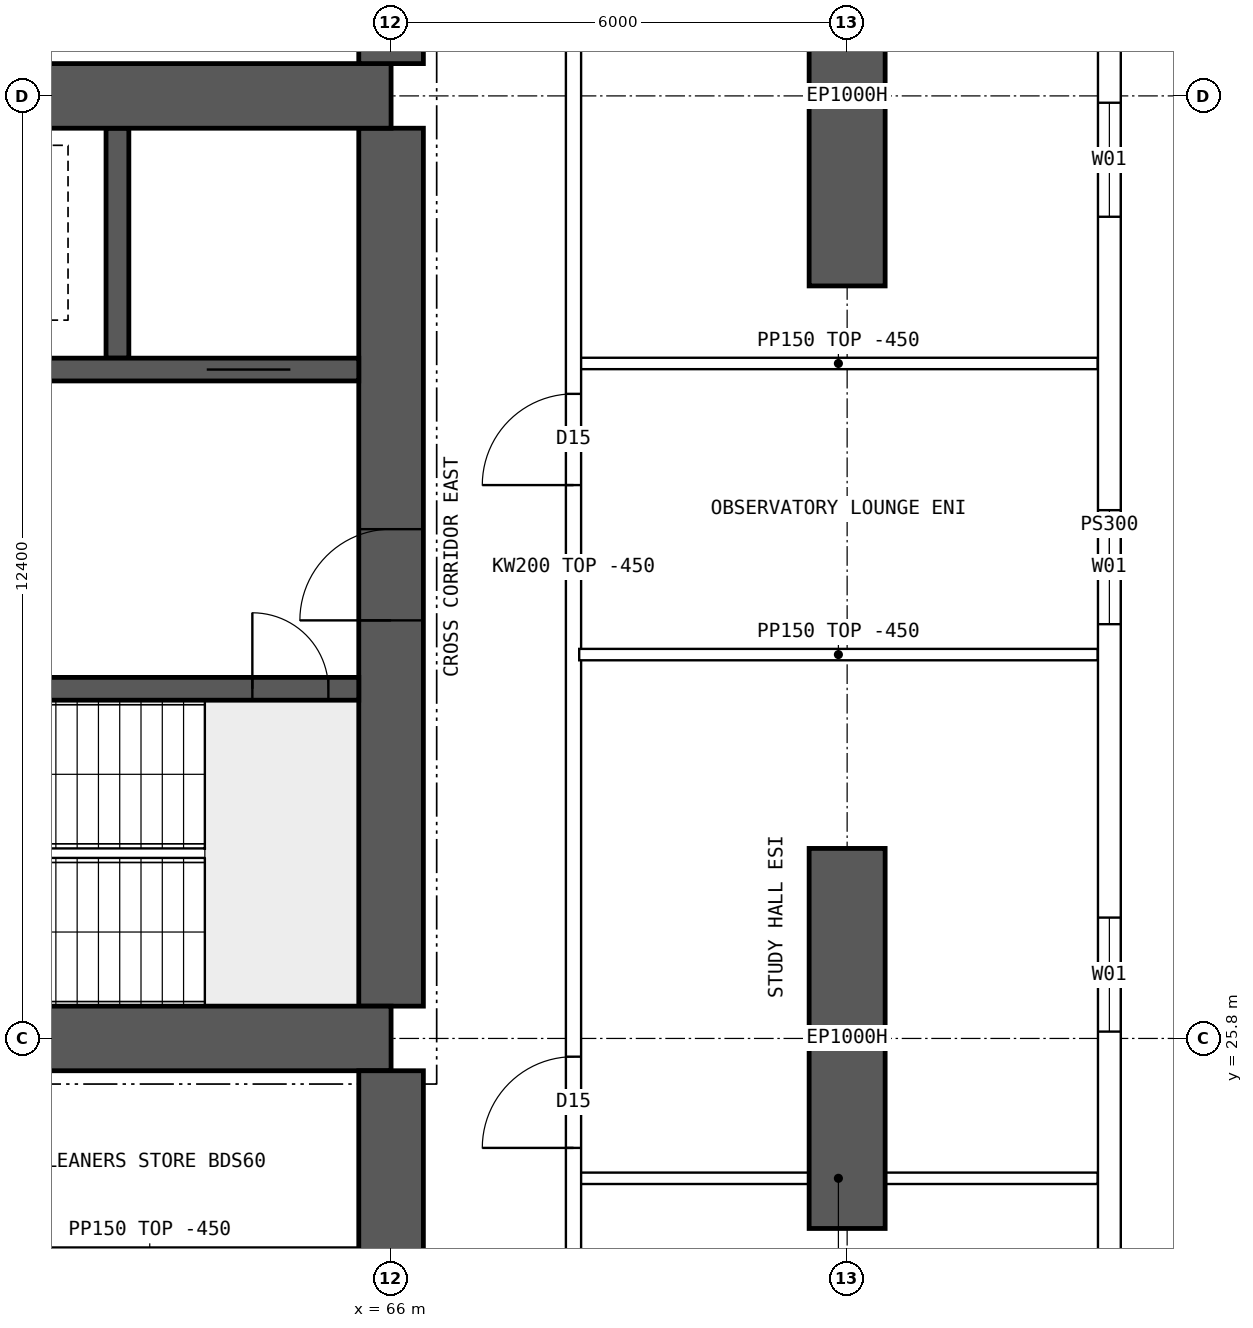
"""IFC4 building model, lengths in metres.
Left out: names, types, materials, properties, quantities, classifications, styles, units other than length and angle.
Written with IfcOpenShell. Run it as: python <this file> out.ifc"""

import sys

from ifc_helpers import new_model, si_unit, direction, frame, frame_2d, origin, place, context, subcontext, project, spatial, polyline, rectangle, outline, extrude, element, fill, save


model = new_model("IFC4")
c1 = context("Model", 3, precision=1e-05, world=origin(), true_north=direction((0.0, 1.0)))
c2 = subcontext(c1, "Body", "Model", "MODEL_VIEW")
j1 = project(units=[si_unit("LENGTHUNIT", "METRE"), si_unit("PLANEANGLEUNIT", "RADIAN")], contexts=[c1])
p1 = place(None, origin())
s1 = spatial("IfcSite", under=j1, at=p1, CompositionType="ELEMENT")
p2 = place(p1, origin())
s2 = spatial("IfcBuilding", under=s1, at=p2, CompositionType="ELEMENT")
p3 = place(p2, frame((0.0, 0.0, 159.85)))
s3 = spatial("IfcBuildingStorey", under=s2, at=p3, CompositionType="ELEMENT", Elevation=159.85)
for number, where, z_axis, x_axis in (
    (1, (72.0, 23.3, 0.0), (0.0, 0.0, 1.0), (0.0, 1.0, 0.0)),
    (2, (72.0, 35.7, 0.0), (0.0, 0.0, 1.0), (0.0, 1.0, 0.0)),
):
    element("IfcWall", number, at=place(p3, frame(where, z_axis=z_axis, x_axis=x_axis)), inside=s3, PredefinedType="SHEAR", context=c2, shape_type="SweptSolid", body=[
        extrude(rectangle(XDim=5.0, YDim=1.0, at=frame_2d((2.5, 0.0))), origin(), (0.0, 0.0, 1.0), 3.75),
    ])
for number, where, z_axis, x_axis in (
    (3, (18.0, 25.8, 0.0), (0.0, 0.0, 1.0), (1.0, 0.0, 0.0)),
    (4, (18.0, 38.2, 0.0), (0.0, 0.0, 1.0), (1.0, 0.0, 0.0)),
):
    element("IfcWall", number, at=place(p3, frame(where, z_axis=z_axis, x_axis=x_axis)), inside=s3, PredefinedType="SHEAR", context=c2, shape_type="SweptSolid", body=[
        extrude(rectangle(XDim=48.0, YDim=0.85, at=frame_2d((24.0, 0.0))), origin(), (0.0, 0.0, 1.0), 3.75),
    ])
p4 = place(p3, frame((66.0, 26.225, 0.0), z_axis=(0.0, 0.0, 1.0), x_axis=(0.0, 1.0, 0.0)))
e5 = element("IfcWall", 5, at=p4, inside=s3, PredefinedType="SHEAR", context=c2, shape_type="SweptSolid", body=[
    extrude(rectangle(XDim=11.55, YDim=0.85, at=frame_2d((5.775, 0.0))), origin(), (0.0, 0.0, 1.0), 3.75),
])
p5 = place(p4, frame((5.075, 0.0, 0.0)))
e6 = element("IfcOpeningElement", 6, at=p5, cuts=e5, PredefinedType="OPENING", context=c2, shape_type="SweptSolid", body=[
    extrude(rectangle(XDim=1.2, YDim=2.1, at=frame_2d((0.6, 1.05))), frame((0.0, 0.435, 0.0), z_axis=(0.0, -1.0, 0.0), x_axis=(1.0, 0.0, 0.0)), (0.0, 0.0, 1.0), 0.87),
])
p6 = place(p3, frame((18.425, 30.4, 0.0), z_axis=(0.0, 0.0, 1.0), x_axis=(1.0, 0.0, 0.0)))
e7 = element("IfcWall", 7, at=p6, inside=s3, PredefinedType="SHEAR", context=c2, shape_type="SweptSolid", body=[
    extrude(rectangle(XDim=47.15, YDim=0.3, at=frame_2d((23.575, 0.0))), origin(), (0.0, 0.0, 1.0), 3.75),
])
p7 = place(p6, frame((0.4, 0.0, 0.0)))
e8 = element("IfcOpeningElement", 8, at=p7, cuts=e7, PredefinedType="OPENING", context=c2, shape_type="SweptSolid", body=[
    extrude(rectangle(XDim=1.0, YDim=2.1, at=frame_2d((0.5, 1.05))), frame((0.0, 0.16, 0.0), z_axis=(0.0, -1.0, 0.0), x_axis=(1.0, 0.0, 0.0)), (0.0, 0.0, 1.0), 0.32),
])
p8 = place(p6, frame((45.75, 0.0, 0.0)))
e9 = element("IfcOpeningElement", 9, at=p8, cuts=e7, PredefinedType="OPENING", context=c2, shape_type="SweptSolid", body=[
    extrude(rectangle(XDim=1.0, YDim=2.1, at=frame_2d((0.5, 1.05))), frame((0.0, 0.16, 0.0), z_axis=(0.0, -1.0, 0.0), x_axis=(1.0, 0.0, 0.0)), (0.0, 0.0, 1.0), 0.32),
])
p9 = place(p6, frame((8.325, 0.0, 0.0)))
e10 = element("IfcOpeningElement", 10, at=p9, cuts=e7, PredefinedType="OPENING", context=c2, shape_type="SweptSolid", body=[
    extrude(rectangle(XDim=1.1, YDim=2.1, at=frame_2d((0.55, 1.05))), frame((0.0, 0.16, 0.0), z_axis=(0.0, -1.0, 0.0), x_axis=(1.0, 0.0, 0.0)), (0.0, 0.0, 1.0), 0.32),
])
p10 = place(p6, frame((10.925, 0.0, 0.0)))
e11 = element("IfcOpeningElement", 11, at=p10, cuts=e7, PredefinedType="OPENING", context=c2, shape_type="SweptSolid", body=[
    extrude(rectangle(XDim=1.1, YDim=2.1, at=frame_2d((0.55, 1.05))), frame((0.0, 0.16, 0.0), z_axis=(0.0, -1.0, 0.0), x_axis=(1.0, 0.0, 0.0)), (0.0, 0.0, 1.0), 0.32),
])
p11 = place(p6, frame((13.525, 0.0, 0.0)))
e12 = element("IfcOpeningElement", 12, at=p11, cuts=e7, PredefinedType="OPENING", context=c2, shape_type="SweptSolid", body=[
    extrude(rectangle(XDim=1.1, YDim=2.1, at=frame_2d((0.55, 1.05))), frame((0.0, 0.16, 0.0), z_axis=(0.0, -1.0, 0.0), x_axis=(1.0, 0.0, 0.0)), (0.0, 0.0, 1.0), 0.32),
])
p12 = place(p6, frame((16.125, 0.0, 0.0)))
e13 = element("IfcOpeningElement", 13, at=p12, cuts=e7, PredefinedType="OPENING", context=c2, shape_type="SweptSolid", body=[
    extrude(rectangle(XDim=1.1, YDim=2.1, at=frame_2d((0.55, 1.05))), frame((0.0, 0.16, 0.0), z_axis=(0.0, -1.0, 0.0), x_axis=(1.0, 0.0, 0.0)), (0.0, 0.0, 1.0), 0.32),
])
p13 = place(p6, frame((18.9, 0.0, 0.0)))
e14 = element("IfcOpeningElement", 14, at=p13, cuts=e7, PredefinedType="OPENING", context=c2, shape_type="SweptSolid", body=[
    extrude(rectangle(XDim=0.9, YDim=2.1, at=frame_2d((0.45, 1.05))), frame((0.0, 0.16, 0.0), z_axis=(0.0, -1.0, 0.0), x_axis=(1.0, 0.0, 0.0)), (0.0, 0.0, 1.0), 0.32),
])
p14 = place(p6, frame((30.192, 0.0, 0.0)))
e15 = element("IfcOpeningElement", 15, at=p14, cuts=e7, PredefinedType="OPENING", context=c2, shape_type="SweptSolid", body=[
    extrude(rectangle(XDim=1.1, YDim=2.1, at=frame_2d((0.55, 1.05))), frame((0.0, 0.16, 0.0), z_axis=(0.0, -1.0, 0.0), x_axis=(1.0, 0.0, 0.0)), (0.0, 0.0, 1.0), 0.32),
])
p15 = place(p6, frame((33.725, 0.0, 0.0)))
e16 = element("IfcOpeningElement", 16, at=p15, cuts=e7, PredefinedType="OPENING", context=c2, shape_type="SweptSolid", body=[
    extrude(rectangle(XDim=1.1, YDim=2.1, at=frame_2d((0.55, 1.05))), frame((0.0, 0.16, 0.0), z_axis=(0.0, -1.0, 0.0), x_axis=(1.0, 0.0, 0.0)), (0.0, 0.0, 1.0), 0.32),
])
p16 = place(p6, frame((37.258, 0.0, 0.0)))
e17 = element("IfcOpeningElement", 17, at=p16, cuts=e7, PredefinedType="OPENING", context=c2, shape_type="SweptSolid", body=[
    extrude(rectangle(XDim=1.1, YDim=2.1, at=frame_2d((0.55, 1.05))), frame((0.0, 0.16, 0.0), z_axis=(0.0, -1.0, 0.0), x_axis=(1.0, 0.0, 0.0)), (0.0, 0.0, 1.0), 0.32),
])
p17 = place(p3, frame((18.425, 34.6, 0.0), z_axis=(0.0, 0.0, 1.0), x_axis=(1.0, 0.0, 0.0)))
e18 = element("IfcWall", 18, at=p17, inside=s3, PredefinedType="SHEAR", context=c2, shape_type="SweptSolid", body=[
    extrude(rectangle(XDim=47.15, YDim=0.3, at=frame_2d((23.575, 0.0))), origin(), (0.0, 0.0, 1.0), 3.75),
])
p18 = place(p17, frame((0.9, 0.0, 0.0)))
e19 = element("IfcOpeningElement", 19, at=p18, cuts=e18, PredefinedType="OPENING", context=c2, shape_type="SweptSolid", body=[
    extrude(rectangle(XDim=1.1, YDim=2.1, at=frame_2d((0.55, 1.05))), frame((0.0, 0.16, 0.0), z_axis=(0.0, -1.0, 0.0), x_axis=(1.0, 0.0, 0.0)), (0.0, 0.0, 1.0), 0.32),
])
p19 = place(p17, frame((45.15, 0.0, 0.0)))
e20 = element("IfcOpeningElement", 20, at=p19, cuts=e18, PredefinedType="OPENING", context=c2, shape_type="SweptSolid", body=[
    extrude(rectangle(XDim=1.1, YDim=2.1, at=frame_2d((0.55, 1.05))), frame((0.0, 0.16, 0.0), z_axis=(0.0, -1.0, 0.0), x_axis=(1.0, 0.0, 0.0)), (0.0, 0.0, 1.0), 0.32),
])
p20 = place(p17, frame((4.175, 0.0, 0.0)))
e21 = element("IfcOpeningElement", 21, at=p20, cuts=e18, PredefinedType="OPENING", context=c2, shape_type="SweptSolid", body=[
    extrude(rectangle(XDim=0.9, YDim=2.1, at=frame_2d((0.45, 1.05))), frame((0.0, 0.16, 0.0), z_axis=(0.0, -1.0, 0.0), x_axis=(1.0, 0.0, 0.0)), (0.0, 0.0, 1.0), 0.32),
])
p21 = place(p17, frame((42.075, 0.0, 0.0)))
e22 = element("IfcOpeningElement", 22, at=p21, cuts=e18, PredefinedType="OPENING", context=c2, shape_type="SweptSolid", body=[
    extrude(rectangle(XDim=0.9, YDim=2.1, at=frame_2d((0.45, 1.05))), frame((0.0, 0.16, 0.0), z_axis=(0.0, -1.0, 0.0), x_axis=(1.0, 0.0, 0.0)), (0.0, 0.0, 1.0), 0.32),
])
p22 = place(p17, frame((8.95, 0.0, 0.0)))
e23 = element("IfcOpeningElement", 23, at=p22, cuts=e18, PredefinedType="OPENING", context=c2, shape_type="SweptSolid", body=[
    extrude(rectangle(XDim=0.9, YDim=2.1, at=frame_2d((0.45, 1.05))), frame((0.0, 0.16, 0.0), z_axis=(0.0, -1.0, 0.0), x_axis=(1.0, 0.0, 0.0)), (0.0, 0.0, 1.0), 0.32),
])
p23 = place(p17, frame((12.924, 0.0, 0.0)))
e24 = element("IfcOpeningElement", 24, at=p23, cuts=e18, PredefinedType="OPENING", context=c2, shape_type="SweptSolid", body=[
    extrude(rectangle(XDim=0.9, YDim=2.1, at=frame_2d((0.45, 1.05))), frame((0.0, 0.16, 0.0), z_axis=(0.0, -1.0, 0.0), x_axis=(1.0, 0.0, 0.0)), (0.0, 0.0, 1.0), 0.32),
])
p24 = place(p17, frame((16.571, 0.0, 0.0)))
e25 = element("IfcOpeningElement", 25, at=p24, cuts=e18, PredefinedType="OPENING", context=c2, shape_type="SweptSolid", body=[
    extrude(rectangle(XDim=0.9, YDim=2.1, at=frame_2d((0.45, 1.05))), frame((0.0, 0.16, 0.0), z_axis=(0.0, -1.0, 0.0), x_axis=(1.0, 0.0, 0.0)), (0.0, 0.0, 1.0), 0.32),
])
p25 = place(p17, frame((20.33, 0.0, 0.0)))
e26 = element("IfcOpeningElement", 26, at=p25, cuts=e18, PredefinedType="OPENING", context=c2, shape_type="SweptSolid", body=[
    extrude(rectangle(XDim=0.9, YDim=2.1, at=frame_2d((0.45, 1.05))), frame((0.0, 0.16, 0.0), z_axis=(0.0, -1.0, 0.0), x_axis=(1.0, 0.0, 0.0)), (0.0, 0.0, 1.0), 0.32),
])
p26 = place(p17, frame((24.736, 0.0, 0.0)))
e27 = element("IfcOpeningElement", 27, at=p26, cuts=e18, PredefinedType="OPENING", context=c2, shape_type="SweptSolid", body=[
    extrude(rectangle(XDim=0.9, YDim=2.1, at=frame_2d((0.45, 1.05))), frame((0.0, 0.16, 0.0), z_axis=(0.0, -1.0, 0.0), x_axis=(1.0, 0.0, 0.0)), (0.0, 0.0, 1.0), 0.32),
])
p27 = place(p17, frame((27.533, 0.0, 0.0)))
e28 = element("IfcOpeningElement", 28, at=p27, cuts=e18, PredefinedType="OPENING", context=c2, shape_type="SweptSolid", body=[
    extrude(rectangle(XDim=0.9, YDim=2.1, at=frame_2d((0.45, 1.05))), frame((0.0, 0.16, 0.0), z_axis=(0.0, -1.0, 0.0), x_axis=(1.0, 0.0, 0.0)), (0.0, 0.0, 1.0), 0.32),
])
p28 = place(p17, frame((29.906, 0.0, 0.0)))
e29 = element("IfcOpeningElement", 29, at=p28, cuts=e18, PredefinedType="OPENING", context=c2, shape_type="SweptSolid", body=[
    extrude(rectangle(XDim=0.9, YDim=2.1, at=frame_2d((0.45, 1.05))), frame((0.0, 0.16, 0.0), z_axis=(0.0, -1.0, 0.0), x_axis=(1.0, 0.0, 0.0)), (0.0, 0.0, 1.0), 0.32),
])
p29 = place(p17, frame((35.376, 0.0, 0.0)))
e30 = element("IfcOpeningElement", 30, at=p29, cuts=e18, PredefinedType="OPENING", context=c2, shape_type="SweptSolid", body=[
    extrude(rectangle(XDim=0.9, YDim=2.1, at=frame_2d((0.45, 1.05))), frame((0.0, 0.16, 0.0), z_axis=(0.0, -1.0, 0.0), x_axis=(1.0, 0.0, 0.0)), (0.0, 0.0, 1.0), 0.32),
])
p30 = place(p3, frame((62.4, 34.75, 0.0), z_axis=(0.0, 0.0, 1.0), x_axis=(0.0, 1.0, 0.0)))
e31 = element("IfcWall", 31, at=p30, inside=s3, PredefinedType="SHEAR", context=c2, shape_type="SweptSolid", body=[
    extrude(rectangle(XDim=3.025, YDim=0.3, at=frame_2d((1.512, 0.0))), origin(), (0.0, 0.0, 1.0), 3.75),
])
for number, where, z_axis, x_axis in (
    (32, (66.0, 17.2, 0.0), (0.0, 0.0, 1.0), (0.0, 1.0, 0.0)),
    (33, (66.0, 38.625, 0.0), (0.0, 0.0, 1.0), (0.0, 1.0, 0.0)),
):
    element("IfcWall", number, at=place(p3, frame(where, z_axis=z_axis, x_axis=x_axis)), inside=s3, PredefinedType="SHEAR", context=c2, shape_type="SweptSolid", body=[
        extrude(rectangle(XDim=8.175, YDim=0.85, at=frame_2d((4.087, 0.0))), origin(), (0.0, 0.0, 1.0), 3.75),
    ])
p31 = place(p3, frame((75.45, 18.6, 0.0), z_axis=(0.0, 0.0, 1.0), x_axis=(0.0, 1.0, 0.0)))
e34 = element("IfcWall", 34, at=p31, inside=s3, PredefinedType="SOLIDWALL", context=c2, shape_type="SweptSolid", body=[
    extrude(outline(polyline([(-0.015, -0.15), (26.815, -0.15), (26.785, 0.15), (0.015, 0.15), (-0.015, -0.15)])), origin(), (0.0, 0.0, 1.0), 3.3),
])
p32 = place(p31, frame((1.93, 0.0, 0.9)))
e35 = element("IfcOpeningElement", 35, at=p32, cuts=e34, PredefinedType="OPENING", context=c2, shape_type="SweptSolid", body=[
    extrude(rectangle(XDim=1.5, YDim=2.0, at=frame_2d((0.75, 1.0))), frame((0.0, 0.16, 0.0), z_axis=(0.0, -1.0, 0.0), x_axis=(1.0, 0.0, 0.0)), (0.0, 0.0, 1.0), 0.32),
])
p33 = place(p31, frame((7.29, 0.0, 0.9)))
e36 = element("IfcOpeningElement", 36, at=p33, cuts=e34, PredefinedType="OPENING", context=c2, shape_type="SweptSolid", body=[
    extrude(rectangle(XDim=1.5, YDim=2.0, at=frame_2d((0.75, 1.0))), frame((0.0, 0.16, 0.0), z_axis=(0.0, -1.0, 0.0), x_axis=(1.0, 0.0, 0.0)), (0.0, 0.0, 1.0), 0.32),
])
p34 = place(p31, frame((12.65, 0.0, 0.9)))
e37 = element("IfcOpeningElement", 37, at=p34, cuts=e34, PredefinedType="OPENING", context=c2, shape_type="SweptSolid", body=[
    extrude(rectangle(XDim=1.5, YDim=2.0, at=frame_2d((0.75, 1.0))), frame((0.0, 0.16, 0.0), z_axis=(0.0, -1.0, 0.0), x_axis=(1.0, 0.0, 0.0)), (0.0, 0.0, 1.0), 0.32),
])
p35 = place(p31, frame((18.01, 0.0, 0.9)))
e38 = element("IfcOpeningElement", 38, at=p35, cuts=e34, PredefinedType="OPENING", context=c2, shape_type="SweptSolid", body=[
    extrude(rectangle(XDim=1.5, YDim=2.0, at=frame_2d((0.75, 1.0))), frame((0.0, 0.16, 0.0), z_axis=(0.0, -1.0, 0.0), x_axis=(1.0, 0.0, 0.0)), (0.0, 0.0, 1.0), 0.32),
])
p36 = place(p31, frame((23.37, 0.0, 0.9)))
e39 = element("IfcOpeningElement", 39, at=p36, cuts=e34, PredefinedType="OPENING", context=c2, shape_type="SweptSolid", body=[
    extrude(rectangle(XDim=1.5, YDim=2.0, at=frame_2d((0.75, 1.0))), frame((0.0, 0.16, 0.0), z_axis=(0.0, -1.0, 0.0), x_axis=(1.0, 0.0, 0.0)), (0.0, 0.0, 1.0), 0.32),
])
p37 = place(p3, frame((60.075, 22.975, 0.0), z_axis=(0.0, 0.0, 1.0), x_axis=(1.0, 0.0, 0.0)))
e40 = element("IfcWall", 40, at=p37, inside=s3, PredefinedType="PARTITIONING", context=c2, shape_type="SweptSolid", body=[
    extrude(rectangle(XDim=5.5, YDim=0.15, at=frame_2d((2.75, 0.0))), origin(), (0.0, 0.0, 1.0), 3.3),
])
p38 = place(p37, frame((0.4, 0.0, 0.0)))
e41 = element("IfcOpeningElement", 41, at=p38, cuts=e40, PredefinedType="OPENING", context=c2, shape_type="SweptSolid", body=[
    extrude(rectangle(XDim=1.0, YDim=2.1, at=frame_2d((0.5, 1.05))), frame((0.0, 0.085, 0.0), z_axis=(0.0, -1.0, 0.0), x_axis=(1.0, 0.0, 0.0)), (0.0, 0.0, 1.0), 0.17),
])
p39 = place(p3, frame((68.475, 30.85, 0.0), z_axis=(0.0, 0.0, 1.0), x_axis=(1.0, 0.0, 0.0)))
e42 = element("IfcWall", 42, at=p39, inside=s3, PredefinedType="PARTITIONING", context=c2, shape_type="SweptSolid", body=[
    extrude(outline(polyline([(0.0, 0.0), (6.82, 0.0), (6.82, 3.3), (3.827, 3.3), (3.825, 2.85), (3.227, 2.85), (3.225, 3.3), (0.0, 3.3), (0.0, 0.0)])), frame((0.0, 0.075, 0.0), z_axis=(0.0, -1.0, 0.0), x_axis=(1.0, 0.0, 0.0)), (0.0, 0.0, 1.0), 0.15),
])
p40 = place(p3, frame((68.4, 10.446, 0.0), z_axis=(0.0, 0.0, 1.0), x_axis=(0.0, 1.0, 0.0)))
e43 = element("IfcWall", 43, at=p40, inside=s3, PredefinedType="SOLIDWALL", context=c2, shape_type="SweptSolid", body=[
    extrude(rectangle(XDim=43.107, YDim=0.2, at=frame_2d((21.554, 0.0))), origin(), (0.0, 0.0, 1.0), 3.3),
])
p41 = place(p40, frame((13.914, 0.0, 0.0)))
e44 = element("IfcOpeningElement", 44, at=p41, cuts=e43, PredefinedType="OPENING", context=c2, shape_type="SweptSolid", body=[
    extrude(rectangle(XDim=1.2, YDim=2.1, at=frame_2d((0.6, 1.05))), frame((0.0, 0.11, 0.0), z_axis=(0.0, -1.0, 0.0), x_axis=(1.0, 0.0, 0.0)), (0.0, 0.0, 1.0), 0.22),
])
p42 = place(p40, frame((22.634, 0.0, 0.0)))
e45 = element("IfcOpeningElement", 45, at=p42, cuts=e43, PredefinedType="OPENING", context=c2, shape_type="SweptSolid", body=[
    extrude(rectangle(XDim=1.2, YDim=2.1, at=frame_2d((0.6, 1.05))), frame((0.0, 0.11, 0.0), z_axis=(0.0, -1.0, 0.0), x_axis=(1.0, 0.0, 0.0)), (0.0, 0.0, 1.0), 0.22),
])
p43 = place(p40, frame((5.104, 0.0, 0.0)))
e46 = element("IfcOpeningElement", 46, at=p43, cuts=e43, PredefinedType="OPENING", context=c2, shape_type="SweptSolid", body=[
    extrude(rectangle(XDim=1.4, YDim=2.1, at=frame_2d((0.7, 1.05))), frame((0.0, 0.11, 0.0), z_axis=(0.0, -1.0, 0.0), x_axis=(1.0, 0.0, 0.0)), (0.0, 0.0, 1.0), 0.22),
])
p44 = place(p40, frame((36.504, 0.0, 0.0)))
e47 = element("IfcOpeningElement", 47, at=p44, cuts=e43, PredefinedType="OPENING", context=c2, shape_type="SweptSolid", body=[
    extrude(rectangle(XDim=1.4, YDim=2.1, at=frame_2d((0.7, 1.05))), frame((0.0, 0.11, 0.0), z_axis=(0.0, -1.0, 0.0), x_axis=(1.0, 0.0, 0.0)), (0.0, 0.0, 1.0), 0.22),
])
p45 = place(p3, frame((68.475, 23.96, 0.0), z_axis=(0.0, 0.0, 1.0), x_axis=(1.0, 0.0, 0.0)))
e48 = element("IfcWall", 48, at=p45, inside=s3, PredefinedType="PARTITIONING", context=c2, shape_type="SweptSolid", body=[
    extrude(rectangle(XDim=6.82, YDim=0.15, at=frame_2d((3.41, 0.0))), origin(), (0.0, 0.0, 1.0), 3.3),
])
p46 = place(p3, frame((68.475, 34.68, 0.0), z_axis=(0.0, 0.0, 1.0), x_axis=(1.0, 0.0, 0.0)))
e49 = element("IfcWall", 49, at=p46, inside=s3, PredefinedType="PARTITIONING", context=c2, shape_type="SweptSolid", body=[
    extrude(outline(polyline([(0.0, 0.0), (6.82, 0.0), (6.82, 3.3), (3.827, 3.3), (3.825, 2.85), (3.227, 2.85), (3.225, 3.3), (0.0, 3.3), (0.0, 0.0)])), frame((0.0, 0.075, 0.0), z_axis=(0.0, -1.0, 0.0), x_axis=(1.0, 0.0, 0.0)), (0.0, 0.0, 1.0), 0.15),
])
p47 = place(p33, origin())
e50 = element("IfcWindow", 50, at=p47, inside=s3, PartitioningType="SINGLE_PANEL", PredefinedType="WINDOW", context=c2, shape_type="SweptSolid", body=[
    extrude(rectangle(XDim=1.5, YDim=2.0, at=frame_2d((0.75, 1.0))), frame((0.0, 0.03, 0.0), z_axis=(0.0, -1.0, 0.0), x_axis=(1.0, 0.0, 0.0)), (0.0, 0.0, 1.0), 0.06),
])
fill(e36, e50)
p48 = place(p34, origin())
e51 = element("IfcWindow", 51, at=p48, inside=s3, PartitioningType="SINGLE_PANEL", PredefinedType="WINDOW", context=c2, shape_type="SweptSolid", body=[
    extrude(rectangle(XDim=1.5, YDim=2.0, at=frame_2d((0.75, 1.0))), frame((0.0, 0.03, 0.0), z_axis=(0.0, -1.0, 0.0), x_axis=(1.0, 0.0, 0.0)), (0.0, 0.0, 1.0), 0.06),
])
fill(e37, e51)
p49 = place(p35, origin())
e52 = element("IfcWindow", 52, at=p49, inside=s3, PartitioningType="SINGLE_PANEL", PredefinedType="WINDOW", context=c2, shape_type="SweptSolid", body=[
    extrude(rectangle(XDim=1.5, YDim=2.0, at=frame_2d((0.75, 1.0))), frame((0.0, 0.03, 0.0), z_axis=(0.0, -1.0, 0.0), x_axis=(1.0, 0.0, 0.0)), (0.0, 0.0, 1.0), 0.06),
])
fill(e38, e52)
p50 = place(p5, origin())
e53 = element("IfcDoor", 53, at=p50, inside=s3, OperationType="SINGLE_SWING_LEFT", PredefinedType="DOOR", context=c2, shape_type="SweptSolid", body=[
    extrude(rectangle(XDim=1.2, YDim=2.1, at=frame_2d((0.6, 1.05))), frame((0.0, 0.025, 0.0), z_axis=(0.0, -1.0, 0.0), x_axis=(1.0, 0.0, 0.0)), (0.0, 0.0, 1.0), 0.05),
])
fill(e6, e53)
p51 = place(p8, origin())
e54 = element("IfcDoor", 54, at=p51, inside=s3, OperationType="SINGLE_SWING_LEFT", PredefinedType="DOOR", context=c2, shape_type="SweptSolid", body=[
    extrude(rectangle(XDim=1.0, YDim=2.1, at=frame_2d((0.5, 1.05))), frame((0.0, 0.025, 0.0), z_axis=(0.0, -1.0, 0.0), x_axis=(1.0, 0.0, 0.0)), (0.0, 0.0, 1.0), 0.05),
])
fill(e9, e54)
p52 = place(p19, origin())
e55 = element("IfcDoor", 55, at=p52, inside=s3, OperationType="DOUBLE_DOOR_SLIDING", PredefinedType="DOOR", context=c2, shape_type="SweptSolid", body=[
    extrude(rectangle(XDim=1.1, YDim=2.1, at=frame_2d((0.55, 1.05))), frame((0.0, 0.025, 0.0), z_axis=(0.0, -1.0, 0.0), x_axis=(1.0, 0.0, 0.0)), (0.0, 0.0, 1.0), 0.05),
])
fill(e20, e55)
p53 = place(p41, origin())
e56 = element("IfcDoor", 56, at=p53, inside=s3, OperationType="SINGLE_SWING_LEFT", PredefinedType="DOOR", context=c2, shape_type="SweptSolid", body=[
    extrude(rectangle(XDim=1.2, YDim=2.1, at=frame_2d((0.6, 1.05))), frame((0.0, 0.025, 0.0), z_axis=(0.0, -1.0, 0.0), x_axis=(1.0, 0.0, 0.0)), (0.0, 0.0, 1.0), 0.05),
])
fill(e44, e56)
p54 = place(p42, origin())
e57 = element("IfcDoor", 57, at=p54, inside=s3, OperationType="SINGLE_SWING_LEFT", PredefinedType="DOOR", context=c2, shape_type="SweptSolid", body=[
    extrude(rectangle(XDim=1.2, YDim=2.1, at=frame_2d((0.6, 1.05))), frame((0.0, 0.025, 0.0), z_axis=(0.0, -1.0, 0.0), x_axis=(1.0, 0.0, 0.0)), (0.0, 0.0, 1.0), 0.05),
])
fill(e45, e57)
save(model, sys.argv[1])
